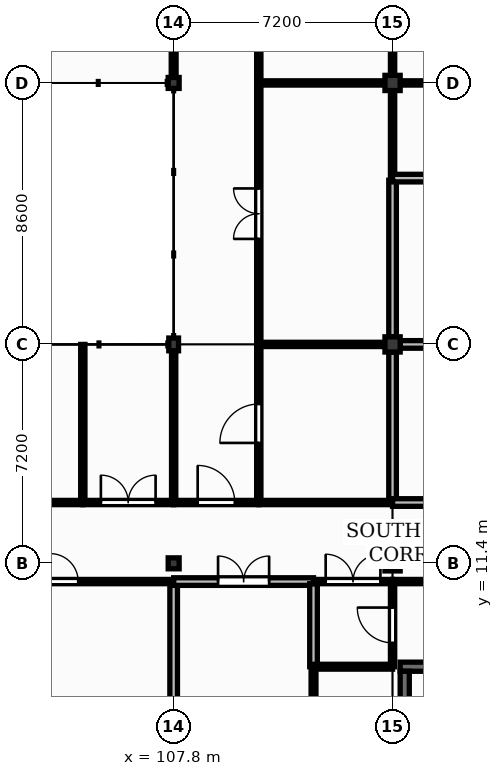
"""IFC4 building model, lengths in metres.
Left out: names, types, materials, properties, quantities, classifications, styles, units other than length and angle.
Written with IfcOpenShell. Run it as: python <this file> out.ifc"""

import sys

from ifc_helpers import new_model, si_unit, direction, frame, frame_2d, origin, origin_2d, place, context, subcontext, project, spatial, rectangle, extrude, element, fill, save


model = new_model("IFC4")
c1 = context("Model", 3, precision=1e-05, world=origin(), true_north=direction((0.0, 1.0)))
c2 = subcontext(c1, "Body", "Model", "MODEL_VIEW")
j1 = project(units=[si_unit("LENGTHUNIT", "METRE"), si_unit("PLANEANGLEUNIT", "RADIAN")], contexts=[c1])
p1 = place(None, origin())
s1 = spatial("IfcSite", under=j1, at=p1, CompositionType="ELEMENT")
p2 = place(p1, origin())
s2 = spatial("IfcBuilding", under=s1, at=p2, CompositionType="ELEMENT")
p3 = place(p2, frame((0.0, 0.0, 4.5)))
s3 = spatial("IfcBuildingStorey", under=s2, at=p3, CompositionType="ELEMENT", Elevation=4.5)
p4 = place(p3, frame((107.8, 11.4, 0.0), z_axis=(0.0, 0.0, 1.0), x_axis=(1.0, 0.0, 0.0)))
e1 = element("IfcColumn", 1, at=p4, inside=s3, PredefinedType="COLUMN", context=c2, shape_type="SweptSolid", body=[
    extrude(rectangle(XDim=0.36, YDim=0.36, at=origin_2d()), origin(), (0.0, 0.0, 1.0), 4.26),
])
p5 = place(p3, frame((107.8, 18.6, 0.0), z_axis=(0.0, 0.0, 1.0), x_axis=(1.0, 0.0, 0.0)))
e2 = element("IfcColumn", 2, at=p5, inside=s3, PredefinedType="COLUMN", context=c2, shape_type="SweptSolid", body=[
    extrude(rectangle(XDim=0.32, YDim=0.42, at=origin_2d()), origin(), (0.0, 0.0, 1.0), 4.26),
])
p6 = place(p3, frame((107.8, 27.2, 0.0), z_axis=(0.0, 0.0, 1.0), x_axis=(1.0, 0.0, 0.0)))
e3 = element("IfcColumn", 3, at=p6, inside=s3, PredefinedType="COLUMN", context=c2, shape_type="SweptSolid", body=[
    extrude(rectangle(XDim=0.36, YDim=0.36, at=origin_2d()), origin(), (0.0, 0.0, 1.0), 4.3),
])
for number, where, z_axis, x_axis in (
    (4, (115.0, 11.4, 0.0), (0.0, 0.0, 1.0), (1.0, 0.0, 0.0)),
    (5, (115.0, 18.6, 0.0), (0.0, 0.0, 1.0), (1.0, 0.0, 0.0)),
    (6, (115.0, 27.2, 0.0), (0.0, 0.0, 1.0), (1.0, 0.0, 0.0)),
):
    element("IfcColumn", number, at=place(p3, frame(where, z_axis=z_axis, x_axis=x_axis)), inside=s3, PredefinedType="COLUMN", context=c2, shape_type="SweptSolid", body=[
        extrude(rectangle(XDim=0.5, YDim=0.5, at=origin_2d()), origin(), (0.0, 0.0, 1.0), 4.22),
    ])
p7 = place(p3, frame((115.25, 8.0, 0.0), z_axis=(0.0, 0.0, 1.0), x_axis=(1.0, 0.0, 0.0)))
e7 = element("IfcWall", 7, at=p7, inside=s3, PredefinedType="SHEAR", context=c2, shape_type="SweptSolid", body=[
    extrude(rectangle(XDim=6.7, YDim=0.3, at=frame_2d((3.35, 0.0))), origin(), (0.0, 0.0, 1.0), 4.25),
])
p8 = place(p3, frame((115.4, 4.95, 0.0), z_axis=(0.0, 0.0, 1.0), x_axis=(0.0, 1.0, 0.0)))
e8 = element("IfcWall", 8, at=p8, inside=s3, PredefinedType="SHEAR", context=c2, shape_type="SweptSolid", body=[
    extrude(rectangle(XDim=2.9, YDim=0.3, at=frame_2d((1.45, 0.0))), origin(), (0.0, 0.0, 1.0), 4.25),
])
p9 = place(p3, frame((100.6, 10.8, 0.0), z_axis=(0.0, 0.0, 1.0), x_axis=(1.0, 0.0, 0.0)))
e9 = element("IfcWall", 9, at=p9, inside=s3, PredefinedType="PARTITIONING", context=c2, shape_type="SweptSolid", body=[
    extrude(rectangle(XDim=7.2, YDim=0.14, at=frame_2d((3.6, 0.0))), origin(), (0.0, 0.0, 1.0), 4.18),
])
p10 = place(p9, frame((3.14, 0.0, 0.0)))
e10 = element("IfcOpeningElement", 10, at=p10, cuts=e9, PredefinedType="OPENING", context=c2, shape_type="SweptSolid", body=[
    extrude(rectangle(XDim=0.92, YDim=2.1, at=frame_2d((0.46, 1.05))), frame((0.0, 0.08, 0.0), z_axis=(0.0, -1.0, 0.0), x_axis=(1.0, 0.0, 0.0)), (0.0, 0.0, 1.0), 0.16),
])
p11 = place(p3, frame((100.6, 13.4, 0.0), z_axis=(0.0, 0.0, 1.0), x_axis=(1.0, 0.0, 0.0)))
e11 = element("IfcWall", 11, at=p11, inside=s3, PredefinedType="PARTITIONING", context=c2, shape_type="SweptSolid", body=[
    extrude(rectangle(XDim=4.212, YDim=0.14, at=frame_2d((2.106, 0.0))), origin(), (0.0, 0.0, 1.0), 4.18),
])
p12 = place(p11, frame((1.276, 0.0, 0.0)))
e12 = element("IfcOpeningElement", 12, at=p12, cuts=e11, PredefinedType="OPENING", context=c2, shape_type="SweptSolid", body=[
    extrude(rectangle(XDim=1.66, YDim=2.3, at=frame_2d((0.83, 1.15))), frame((0.0, 0.08, 0.0), z_axis=(0.0, -1.0, 0.0), x_axis=(1.0, 0.0, 0.0)), (0.0, 0.0, 1.0), 0.16),
])
p13 = place(p3, frame((104.812, 13.47, 0.0), z_axis=(0.0, 0.0, 1.0), x_axis=(0.0, 1.0, 0.0)))
e13 = element("IfcWall", 13, at=p13, inside=s3, PredefinedType="PARTITIONING", context=c2, shape_type="SweptSolid", body=[
    extrude(rectangle(XDim=5.13, YDim=0.14, at=frame_2d((2.565, 0.0))), origin(), (0.0, 0.0, 1.0), 4.18),
])
p14 = place(p3, frame((104.812, 13.4, 0.0), z_axis=(0.0, 0.0, 1.0), x_axis=(1.0, 0.0, 0.0)))
e14 = element("IfcWall", 14, at=p14, inside=s3, PredefinedType="PARTITIONING", context=c2, shape_type="SweptSolid", body=[
    extrude(rectangle(XDim=2.988, YDim=0.14, at=frame_2d((1.494, 0.0))), origin(), (0.0, 0.0, 1.0), 4.18),
])
p15 = place(p14, frame((0.594, 0.0, 0.0)))
e15 = element("IfcOpeningElement", 15, at=p15, cuts=e14, PredefinedType="OPENING", context=c2, shape_type="SweptSolid", body=[
    extrude(rectangle(XDim=1.8, YDim=2.3, at=frame_2d((0.9, 1.15))), frame((0.0, 0.08, 0.0), z_axis=(0.0, -1.0, 0.0), x_axis=(1.0, 0.0, 0.0)), (0.0, 0.0, 1.0), 0.16),
])
p16 = place(p3, frame((107.8, 4.41, 0.0), z_axis=(0.0, 0.0, 1.0), x_axis=(0.0, 1.0, 0.0)))
e16 = element("IfcWall", 16, at=p16, inside=s3, PredefinedType="SOLIDWALL", context=c2, shape_type="SweptSolid", body=[
    extrude(rectangle(XDim=6.32, YDim=0.25, at=frame_2d((3.16, 0.0))), origin(), (0.0, 0.0, 1.0), 3.74),
])
p17 = place(p3, frame((107.8, 10.8, 0.0), z_axis=(0.0, 0.0, 1.0), x_axis=(1.0, 0.0, 0.0)))
e17 = element("IfcWall", 17, at=p17, inside=s3, PredefinedType="SOLIDWALL", context=c2, shape_type="SweptSolid", body=[
    extrude(rectangle(XDim=4.6, YDim=0.25, at=frame_2d((2.3, 0.0))), origin(), (0.0, 0.0, 1.0), 4.18),
])
p18 = place(p17, frame((1.46, 0.0, 0.0)))
e18 = element("IfcOpeningElement", 18, at=p18, cuts=e17, PredefinedType="OPENING", context=c2, shape_type="SweptSolid", body=[
    extrude(rectangle(XDim=1.68, YDim=2.3, at=frame_2d((0.84, 1.15))), frame((0.0, 0.135, 0.0), z_axis=(0.0, -1.0, 0.0), x_axis=(1.0, 0.0, 0.0)), (0.0, 0.0, 1.0), 0.27),
])
p19 = place(p3, frame((107.8, 13.47, 0.0), z_axis=(0.0, 0.0, 1.0), x_axis=(0.0, 1.0, 0.0)))
e19 = element("IfcWall", 19, at=p19, inside=s3, PredefinedType="PARTITIONING", context=c2, shape_type="SweptSolid", body=[
    extrude(rectangle(XDim=4.92, YDim=0.14, at=frame_2d((2.46, 0.0))), origin(), (0.0, 0.0, 1.0), 3.74),
])
p20 = place(p3, frame((107.8, 13.4, 0.0), z_axis=(0.0, 0.0, 1.0), x_axis=(1.0, 0.0, 0.0)))
e20 = element("IfcWall", 20, at=p20, inside=s3, PredefinedType="PARTITIONING", context=c2, shape_type="SweptSolid", body=[
    extrude(rectangle(XDim=2.8, YDim=0.14, at=frame_2d((1.4, 0.0))), origin(), (0.0, 0.0, 1.0), 4.18),
])
p21 = place(p20, frame((0.79, 0.0, 0.0)))
e21 = element("IfcOpeningElement", 21, at=p21, cuts=e20, PredefinedType="OPENING", context=c2, shape_type="SweptSolid", body=[
    extrude(rectangle(XDim=1.22, YDim=2.1, at=frame_2d((0.61, 1.05))), frame((0.0, 0.08, 0.0), z_axis=(0.0, -1.0, 0.0), x_axis=(1.0, 0.0, 0.0)), (0.0, 0.0, 1.0), 0.16),
])
p22 = place(p3, frame((110.6, 13.47, 0.0), z_axis=(0.0, 0.0, 1.0), x_axis=(0.0, 1.0, 0.0)))
e22 = element("IfcWall", 22, at=p22, inside=s3, PredefinedType="PARTITIONING", context=c2, shape_type="SweptSolid", body=[
    extrude(rectangle(XDim=5.06, YDim=0.14, at=frame_2d((2.53, 0.0))), origin(), (0.0, 0.0, 1.0), 4.18),
])
p23 = place(p22, frame((1.89, 0.0, 0.0)))
e23 = element("IfcOpeningElement", 23, at=p23, cuts=e22, PredefinedType="OPENING", context=c2, shape_type="SweptSolid", body=[
    extrude(rectangle(XDim=1.28, YDim=2.2, at=frame_2d((0.64, 1.1))), frame((0.0, 0.08, 0.0), z_axis=(0.0, -1.0, 0.0), x_axis=(1.0, 0.0, 0.0)), (0.0, 0.0, 1.0), 0.16),
])
p24 = place(p3, frame((110.6, 13.4, 0.0), z_axis=(0.0, 0.0, 1.0), x_axis=(1.0, 0.0, 0.0)))
e24 = element("IfcWall", 24, at=p24, inside=s3, PredefinedType="PARTITIONING", context=c2, shape_type="SweptSolid", body=[
    extrude(rectangle(XDim=4.4, YDim=0.14, at=frame_2d((2.2, 0.0))), origin(), (0.0, 0.0, 1.0), 4.18),
])
p25 = place(p3, frame((110.6, 18.67, 0.0), z_axis=(0.0, 0.0, 1.0), x_axis=(0.0, 1.0, 0.0)))
e25 = element("IfcWall", 25, at=p25, inside=s3, PredefinedType="PARTITIONING", context=c2, shape_type="SweptSolid", body=[
    extrude(rectangle(XDim=8.46, YDim=0.14, at=frame_2d((4.23, 0.0))), origin(), (0.0, 0.0, 1.0), 4.18),
])
p26 = place(p25, frame((3.4, 0.0, 0.0)))
e26 = element("IfcOpeningElement", 26, at=p26, cuts=e25, PredefinedType="OPENING", context=c2, shape_type="SweptSolid", body=[
    extrude(rectangle(XDim=1.66, YDim=2.3, at=frame_2d((0.83, 1.15))), frame((0.0, 0.08, 0.0), z_axis=(0.0, -1.0, 0.0), x_axis=(1.0, 0.0, 0.0)), (0.0, 0.0, 1.0), 0.16),
])
p27 = place(p3, frame((110.6, 18.6, 0.0), z_axis=(0.0, 0.0, 1.0), x_axis=(1.0, 0.0, 0.0)))
e27 = element("IfcWall", 27, at=p27, inside=s3, PredefinedType="PARTITIONING", context=c2, shape_type="SweptSolid", body=[
    extrude(rectangle(XDim=4.15, YDim=0.14, at=frame_2d((2.075, 0.0))), origin(), (0.0, 0.0, 1.0), 3.76),
])
p28 = place(p3, frame((110.6, 27.27, 0.0), z_axis=(0.0, 0.0, 1.0), x_axis=(0.0, 1.0, 0.0)))
e28 = element("IfcWall", 28, at=p28, inside=s3, PredefinedType="PARTITIONING", context=c2, shape_type="SweptSolid", body=[
    extrude(rectangle(XDim=9.46, YDim=0.14, at=frame_2d((4.73, 0.0))), origin(), (0.0, 0.0, 1.0), 4.18),
])
p29 = place(p28, frame((3.9, 0.0, 0.0)))
e29 = element("IfcOpeningElement", 29, at=p29, cuts=e28, PredefinedType="OPENING", context=c2, shape_type="SweptSolid", body=[
    extrude(rectangle(XDim=1.66, YDim=2.3, at=frame_2d((0.83, 1.15))), frame((0.0, 0.08, 0.0), z_axis=(0.0, -1.0, 0.0), x_axis=(1.0, 0.0, 0.0)), (0.0, 0.0, 1.0), 0.16),
])
p30 = place(p3, frame((110.6, 27.2, 0.0), z_axis=(0.0, 0.0, 1.0), x_axis=(1.0, 0.0, 0.0)))
e30 = element("IfcWall", 30, at=p30, inside=s3, PredefinedType="PARTITIONING", context=c2, shape_type="SweptSolid", body=[
    extrude(rectangle(XDim=4.15, YDim=0.14, at=frame_2d((2.075, 0.0))), origin(), (0.0, 0.0, 1.0), 3.87),
])
p31 = place(p3, frame((112.4, 8.0, 0.0), z_axis=(0.0, 0.0, 1.0), x_axis=(0.0, 1.0, 0.0)))
e31 = element("IfcWall", 31, at=p31, inside=s3, PredefinedType="SOLIDWALL", context=c2, shape_type="SweptSolid", body=[
    extrude(rectangle(XDim=2.73, YDim=0.25, at=frame_2d((1.365, 0.0))), origin(), (0.0, 0.0, 1.0), 4.18),
])
p32 = place(p3, frame((112.4, 10.8, 0.0), z_axis=(0.0, 0.0, 1.0), x_axis=(1.0, 0.0, 0.0)))
e32 = element("IfcWall", 32, at=p32, inside=s3, PredefinedType="PARTITIONING", context=c2, shape_type="SweptSolid", body=[
    extrude(rectangle(XDim=2.6, YDim=0.14, at=frame_2d((1.3, 0.0))), origin(), (0.0, 0.0, 1.0), 4.18),
])
p33 = place(p32, frame((0.4, 0.0, 0.0)))
e33 = element("IfcOpeningElement", 33, at=p33, cuts=e32, PredefinedType="OPENING", context=c2, shape_type="SweptSolid", body=[
    extrude(rectangle(XDim=1.8, YDim=2.3, at=frame_2d((0.9, 1.15))), frame((0.0, 0.08, 0.0), z_axis=(0.0, -1.0, 0.0), x_axis=(1.0, 0.0, 0.0)), (0.0, 0.0, 1.0), 0.16),
])
p34 = place(p3, frame((115.0, 8.0, 0.0), z_axis=(0.0, 0.0, 1.0), x_axis=(0.0, 1.0, 0.0)))
e34 = element("IfcWall", 34, at=p34, inside=s3, PredefinedType="PARTITIONING", context=c2, shape_type="SweptSolid", body=[
    extrude(rectangle(XDim=2.73, YDim=0.14, at=frame_2d((1.365, 0.0))), origin(), (0.0, 0.0, 1.0), 3.52),
])
p35 = place(p34, frame((0.785, 0.0, 0.0)))
e35 = element("IfcOpeningElement", 35, at=p35, cuts=e34, PredefinedType="OPENING", context=c2, shape_type="SweptSolid", body=[
    extrude(rectangle(XDim=1.16, YDim=2.1, at=frame_2d((0.58, 1.05))), frame((0.0, 0.08, 0.0), z_axis=(0.0, -1.0, 0.0), x_axis=(1.0, 0.0, 0.0)), (0.0, 0.0, 1.0), 0.16),
])
p36 = place(p3, frame((115.0, 10.8, 0.0), z_axis=(0.0, 0.0, 1.0), x_axis=(1.0, 0.0, 0.0)))
e36 = element("IfcWall", 36, at=p36, inside=s3, PredefinedType="PARTITIONING", context=c2, shape_type="SweptSolid", body=[
    extrude(rectangle(XDim=6.8, YDim=0.14, at=frame_2d((3.4, 0.0))), origin(), (0.0, 0.0, 1.0), 4.18),
])
p37 = place(p36, frame((2.95, 0.0, 0.0)))
e37 = element("IfcOpeningElement", 37, at=p37, cuts=e36, PredefinedType="OPENING", context=c2, shape_type="SweptSolid", body=[
    extrude(rectangle(XDim=0.9, YDim=2.1, at=frame_2d((0.45, 1.05))), frame((0.0, 0.08, 0.0), z_axis=(0.0, -1.0, 0.0), x_axis=(1.0, 0.0, 0.0)), (0.0, 0.0, 1.0), 0.16),
])
p38 = place(p3, frame((115.0, 13.47, 0.0), z_axis=(0.0, 0.0, 1.0), x_axis=(0.0, 1.0, 0.0)))
e38 = element("IfcWall", 38, at=p38, inside=s3, PredefinedType="SOLIDWALL", context=c2, shape_type="SweptSolid", body=[
    extrude(rectangle(XDim=4.88, YDim=0.25, at=frame_2d((2.44, 0.0))), origin(), (0.0, 0.0, 1.0), 3.52),
])
p39 = place(p3, frame((115.0, 13.4, 0.0), z_axis=(0.0, 0.0, 1.0), x_axis=(1.0, 0.0, 0.0)))
e39 = element("IfcWall", 39, at=p39, inside=s3, PredefinedType="SOLIDWALL", context=c2, shape_type="SweptSolid", body=[
    extrude(rectangle(XDim=6.8, YDim=0.25, at=frame_2d((3.4, 0.0))), origin(), (0.0, 0.0, 1.0), 4.18),
])
p40 = place(p39, frame((2.86, 0.0, 0.0)))
e40 = element("IfcOpeningElement", 40, at=p40, cuts=e39, PredefinedType="OPENING", context=c2, shape_type="SweptSolid", body=[
    extrude(rectangle(XDim=1.08, YDim=2.15, at=frame_2d((0.54, 1.075))), frame((0.0, 0.135, 0.0), z_axis=(0.0, -1.0, 0.0), x_axis=(1.0, 0.0, 0.0)), (0.0, 0.0, 1.0), 0.27),
])
p41 = place(p39, frame((4.34, 0.0, 1.05)))
e41 = element("IfcOpeningElement", 41, at=p41, cuts=e39, PredefinedType="OPENING", context=c2, shape_type="SweptSolid", body=[
    extrude(rectangle(XDim=1.6, YDim=1.1, at=frame_2d((0.8, 0.55))), frame((0.0, 0.135, 0.0), z_axis=(0.0, -1.0, 0.0), x_axis=(1.0, 0.0, 0.0)), (0.0, 0.0, 1.0), 0.27),
])
p42 = place(p3, frame((115.0, 18.85, 0.0), z_axis=(0.0, 0.0, 1.0), x_axis=(0.0, 1.0, 0.0)))
e42 = element("IfcWall", 42, at=p42, inside=s3, PredefinedType="SOLIDWALL", context=c2, shape_type="SweptSolid", body=[
    extrude(rectangle(XDim=5.15, YDim=0.25, at=frame_2d((2.575, 0.0))), origin(), (0.0, 0.0, 1.0), 3.52),
])
p43 = place(p3, frame((115.25, 18.6, 0.0), z_axis=(0.0, 0.0, 1.0), x_axis=(1.0, 0.0, 0.0)))
e43 = element("IfcWall", 43, at=p43, inside=s3, PredefinedType="SOLIDWALL", context=c2, shape_type="SweptSolid", body=[
    extrude(rectangle(XDim=6.55, YDim=0.25, at=frame_2d((3.275, 0.0))), origin(), (0.0, 0.0, 1.0), 3.52),
])
p44 = place(p3, frame((115.0, 24.14, 0.0), z_axis=(0.0, 0.0, 1.0), x_axis=(0.0, 1.0, 0.0)))
e44 = element("IfcWall", 44, at=p44, inside=s3, PredefinedType="PARTITIONING", context=c2, shape_type="SweptSolid", body=[
    extrude(rectangle(XDim=2.81, YDim=0.14, at=frame_2d((1.405, 0.0))), origin(), (0.0, 0.0, 1.0), 3.52),
])
p45 = place(p3, frame((115.0, 24.07, 0.0), z_axis=(0.0, 0.0, 1.0), x_axis=(1.0, 0.0, 0.0)))
e45 = element("IfcWall", 45, at=p45, inside=s3, PredefinedType="SOLIDWALL", context=c2, shape_type="SweptSolid", body=[
    extrude(rectangle(XDim=6.8, YDim=0.25, at=frame_2d((3.4, 0.0))), origin(), (0.0, 0.0, 1.0), 4.18),
])
p46 = place(p3, frame((115.0, 27.45, 0.0), z_axis=(0.0, 0.0, 1.0), x_axis=(0.0, 1.0, 0.0)))
e46 = element("IfcWall", 46, at=p46, inside=s3, PredefinedType="PARTITIONING", context=c2, shape_type="SweptSolid", body=[
    extrude(rectangle(XDim=2.838, YDim=0.14, at=frame_2d((1.419, 0.0))), origin(), (0.0, 0.0, 1.0), 3.52),
])
p47 = place(p46, frame((0.839, 0.0, 0.0)))
e47 = element("IfcOpeningElement", 47, at=p47, cuts=e46, PredefinedType="OPENING", context=c2, shape_type="SweptSolid", body=[
    extrude(rectangle(XDim=1.16, YDim=2.1, at=frame_2d((0.58, 1.05))), frame((0.0, 0.08, 0.0), z_axis=(0.0, -1.0, 0.0), x_axis=(1.0, 0.0, 0.0)), (0.0, 0.0, 1.0), 0.16),
])
p48 = place(p3, frame((115.25, 27.2, 0.0), z_axis=(0.0, 0.0, 1.0), x_axis=(1.0, 0.0, 0.0)))
e48 = element("IfcWall", 48, at=p48, inside=s3, PredefinedType="PARTITIONING", context=c2, shape_type="SweptSolid", body=[
    extrude(rectangle(XDim=6.55, YDim=0.14, at=frame_2d((3.275, 0.0))), origin(), (0.0, 0.0, 1.0), 3.52),
])
p49 = place(p3, frame((112.4, 8.0, 0.0), z_axis=(0.0, 0.0, 1.0), x_axis=(1.0, 0.0, 0.0)))
e49 = element("IfcWall", 49, at=p49, inside=s3, PredefinedType="PARTITIONING", context=c2, shape_type="SweptSolid", body=[
    extrude(rectangle(XDim=2.6, YDim=0.16, at=frame_2d((1.3, 0.0))), origin(), (0.0, 0.0, 1.0), 4.18),
])
p50 = place(p3, frame((107.8, 27.38, 0.0), z_axis=(0.0, 0.0, 1.0), x_axis=(0.0, 1.0, 0.0)))
e50 = element("IfcWall", 50, at=p50, inside=s3, PredefinedType="PARTITIONING", context=c2, shape_type="SweptSolid", body=[
    extrude(rectangle(XDim=9.24, YDim=0.16, at=frame_2d((4.62, 0.0))), origin(), (0.0, 0.0, 1.0), 4.18),
])
p51 = place(p3, frame((112.4, 4.2, 0.0), z_axis=(0.0, 0.0, 1.0), x_axis=(0.0, 1.0, 0.0)))
e51 = element("IfcWall", 51, at=p51, inside=s3, PredefinedType="PARTITIONING", context=c2, shape_type="SweptSolid", body=[
    extrude(rectangle(XDim=3.8, YDim=0.16, at=frame_2d((1.9, 0.0))), origin(), (0.0, 0.0, 1.0), 4.18),
])
p52 = place(p33, origin())
e52 = element("IfcDoor", 52, at=p52, inside=s3, OperationType="DOUBLE_DOOR_SINGLE_SWING", PredefinedType="DOOR", context=c2, shape_type="SweptSolid", body=[
    extrude(rectangle(XDim=1.8, YDim=2.3, at=frame_2d((0.9, 1.15))), frame((0.0, 0.025, 0.0), z_axis=(0.0, -1.0, 0.0), x_axis=(1.0, 0.0, 0.0)), (0.0, 0.0, 1.0), 0.05),
])
fill(e33, e52)
p53 = place(p21, origin())
e53 = element("IfcDoor", 53, at=p53, inside=s3, OperationType="SINGLE_SWING_LEFT", PredefinedType="DOOR", context=c2, shape_type="SweptSolid", body=[
    extrude(rectangle(XDim=1.22, YDim=2.1, at=frame_2d((0.61, 1.05))), frame((0.0, 0.025, 0.0), z_axis=(0.0, -1.0, 0.0), x_axis=(1.0, 0.0, 0.0)), (0.0, 0.0, 1.0), 0.05),
])
fill(e21, e53)
p54 = place(p35, origin())
e54 = element("IfcDoor", 54, at=p54, inside=s3, OperationType="SINGLE_SWING_RIGHT", PredefinedType="DOOR", context=c2, shape_type="SweptSolid", body=[
    extrude(rectangle(XDim=1.16, YDim=2.1, at=frame_2d((0.58, 1.05))), frame((0.0, 0.025, 0.0), z_axis=(0.0, -1.0, 0.0), x_axis=(1.0, 0.0, 0.0)), (0.0, 0.0, 1.0), 0.05),
])
fill(e35, e54)
p55 = place(p26, origin())
e55 = element("IfcDoor", 55, at=p55, inside=s3, OperationType="DOUBLE_DOOR_SINGLE_SWING", PredefinedType="DOOR", context=c2, shape_type="SweptSolid", body=[
    extrude(rectangle(XDim=1.66, YDim=2.3, at=frame_2d((0.83, 1.15))), frame((0.0, 0.025, 0.0), z_axis=(0.0, -1.0, 0.0), x_axis=(1.0, 0.0, 0.0)), (0.0, 0.0, 1.0), 0.05),
])
fill(e26, e55)
p56 = place(p10, origin())
e56 = element("IfcDoor", 56, at=p56, inside=s3, OperationType="SINGLE_SWING_LEFT", PredefinedType="DOOR", context=c2, shape_type="SweptSolid", body=[
    extrude(rectangle(XDim=0.92, YDim=2.1, at=frame_2d((0.46, 1.05))), frame((0.0, 0.025, 0.0), z_axis=(0.0, -1.0, 0.0), x_axis=(1.0, 0.0, 0.0)), (0.0, 0.0, 1.0), 0.05),
])
fill(e10, e56)
p57 = place(p15, origin())
e57 = element("IfcDoor", 57, at=p57, inside=s3, OperationType="DOUBLE_DOOR_SINGLE_SWING", PredefinedType="DOOR", context=c2, shape_type="SweptSolid", body=[
    extrude(rectangle(XDim=1.8, YDim=2.3, at=frame_2d((0.9, 1.15))), frame((0.0, 0.025, 0.0), z_axis=(0.0, -1.0, 0.0), x_axis=(1.0, 0.0, 0.0)), (0.0, 0.0, 1.0), 0.05),
])
fill(e15, e57)
p58 = place(p18, origin())
e58 = element("IfcDoor", 58, at=p58, inside=s3, OperationType="DOUBLE_DOOR_SINGLE_SWING", PredefinedType="DOOR", context=c2, shape_type="SweptSolid", body=[
    extrude(rectangle(XDim=1.68, YDim=2.3, at=frame_2d((0.84, 1.15))), frame((0.0, 0.025, 0.0), z_axis=(0.0, -1.0, 0.0), x_axis=(1.0, 0.0, 0.0)), (0.0, 0.0, 1.0), 0.05),
])
fill(e18, e58)
p59 = place(p23, origin())
e59 = element("IfcDoor", 59, at=p59, inside=s3, OperationType="SINGLE_SWING_LEFT", PredefinedType="DOOR", context=c2, shape_type="SweptSolid", body=[
    extrude(rectangle(XDim=1.28, YDim=2.2, at=frame_2d((0.64, 1.1))), frame((0.0, 0.025, 0.0), z_axis=(0.0, -1.0, 0.0), x_axis=(1.0, 0.0, 0.0)), (0.0, 0.0, 1.0), 0.05),
])
fill(e23, e59)
save(model, sys.argv[1])
